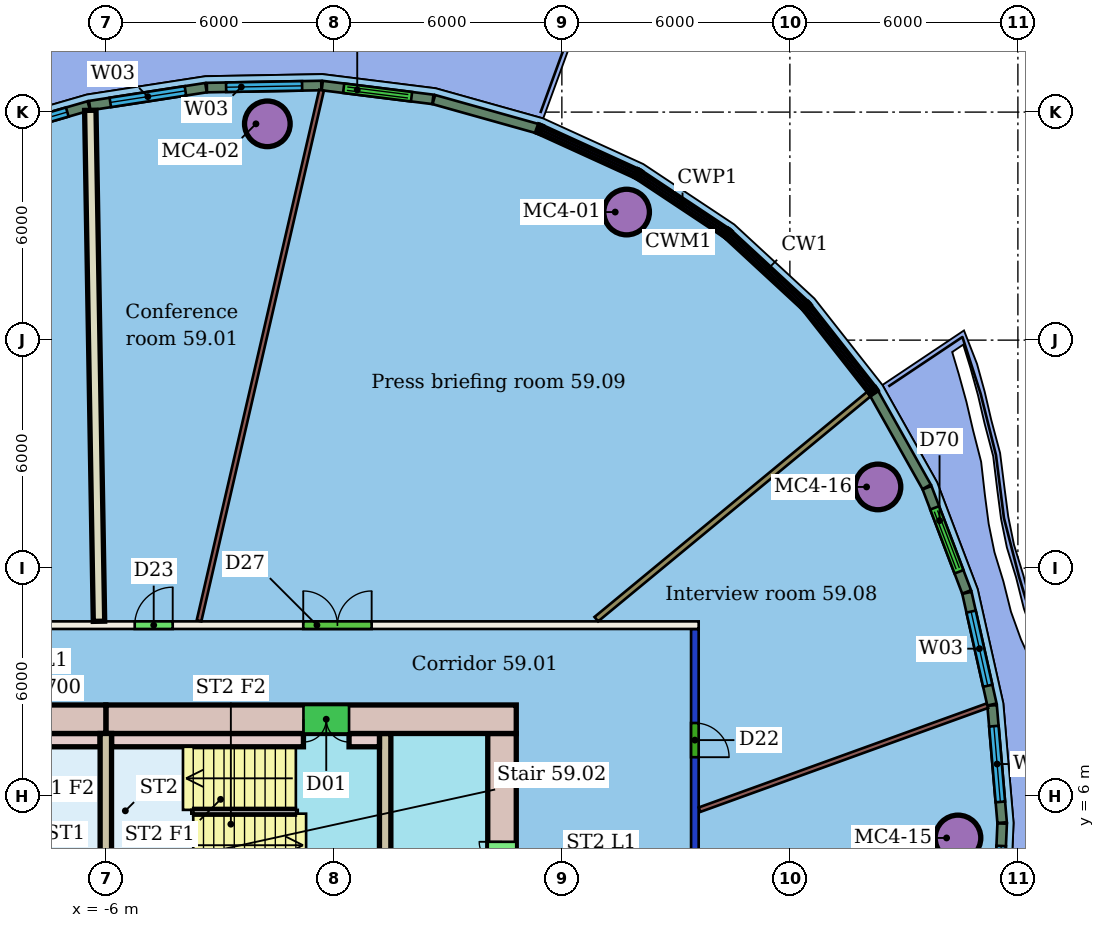
"""IFC4 building model, lengths in metres.
Left out: names, types, materials, properties, quantities, classifications, styles, units other than length and angle.
Written with IfcOpenShell. Run it as: python <this file> out.ifc"""

import sys

from ifc_helpers import new_model, si_unit, direction, frame, frame_2d, origin, origin_2d, place, context, subcontext, project, spatial, rectangle, hollow_circle, extrude, element, fill, save


model = new_model("IFC4")
c1 = context("Model", 3, precision=1e-05, world=origin(), true_north=direction((0.0, 1.0)))
c2 = subcontext(c1, "Body", "Model", "MODEL_VIEW")
j1 = project(units=[si_unit("LENGTHUNIT", "METRE"), si_unit("PLANEANGLEUNIT", "RADIAN")], contexts=[c1])
p1 = place(None, origin())
s1 = spatial("IfcSite", under=j1, at=p1, CompositionType="ELEMENT")
p2 = place(p1, origin())
s2 = spatial("IfcBuilding", under=s1, at=p2, CompositionType="ELEMENT")
p3 = place(p2, frame((0.0, 0.0, 238.9)))
s3 = spatial("IfcBuildingStorey", under=s2, at=p3, CompositionType="ELEMENT", Elevation=238.9)
for number, where, z_axis, x_axis in (
    (1, (7.704, 21.37, 0.0), (0.0, 0.0, 1.0), (1.0, 0.0, 0.0)),
    (2, (-1.75, 23.691, 0.0), (0.0, 0.0, 1.0), (1.0, 0.0, 0.0)),
    (3, (16.424, 4.901, 0.0), (0.0, 0.0, 1.0), (1.0, 0.0, 0.0)),
    (4, (14.318, 14.137, 0.0), (0.0, 0.0, 1.0), (1.0, 0.0, 0.0)),
):
    element("IfcColumn", number, at=place(p3, frame(where, z_axis=z_axis, x_axis=x_axis)), inside=s3, PredefinedType="COLUMN", context=c2, shape_type="SweptSolid", body=[
        extrude(hollow_circle(Radius=0.6, WallThickness=0.045, at=origin_2d()), origin(), (0.0, 0.0, 1.0), 3.4),
    ])
p4 = place(p3, frame((-21.6, 10.5, 0.0), z_axis=(0.0, 0.0, 1.0), x_axis=(1.0, 0.0, 0.0)))
e5 = element("IfcWall", 5, at=p4, inside=s3, PredefinedType="PARTITIONING", context=c2, shape_type="SweptSolid", body=[
    extrude(rectangle(XDim=31.2, YDim=0.2, at=frame_2d((15.6, 0.0))), origin(), (0.0, 0.0, 1.0), 3.4),
])
p5 = place(p4, frame((16.36, 0.0, 0.0)))
e6 = element("IfcOpeningElement", 6, at=p5, cuts=e5, PredefinedType="OPENING", context=c2, shape_type="SweptSolid", body=[
    extrude(rectangle(XDim=1.0, YDim=2.4, at=frame_2d((0.5, 1.2))), frame((0.0, 0.11, 0.0), z_axis=(0.0, -1.0, 0.0), x_axis=(1.0, 0.0, 0.0)), (0.0, 0.0, 1.0), 0.22),
])
p6 = place(p4, frame((9.334, 0.0, 0.0)))
e7 = element("IfcOpeningElement", 7, at=p6, cuts=e5, PredefinedType="OPENING", context=c2, shape_type="SweptSolid", body=[
    extrude(rectangle(XDim=1.8, YDim=2.4, at=frame_2d((0.9, 1.2))), frame((0.0, 0.11, 0.0), z_axis=(0.0, -1.0, 0.0), x_axis=(1.0, 0.0, 0.0)), (0.0, 0.0, 1.0), 0.22),
])
p7 = place(p4, frame((20.795, 0.0, 0.0)))
e8 = element("IfcOpeningElement", 8, at=p7, cuts=e5, PredefinedType="OPENING", context=c2, shape_type="SweptSolid", body=[
    extrude(rectangle(XDim=1.8, YDim=2.4, at=frame_2d((0.9, 1.2))), frame((0.0, 0.11, 0.0), z_axis=(0.0, -1.0, 0.0), x_axis=(1.0, 0.0, 0.0)), (0.0, 0.0, 1.0), 0.22),
])
p8 = place(p3, frame((9.5, 10.4, 0.0), z_axis=(0.0, 0.0, 1.0), x_axis=(0.0, -1.0, 0.0)))
e9 = element("IfcWall", 9, at=p8, inside=s3, PredefinedType="PARTITIONING", context=c2, shape_type="SweptSolid", body=[
    extrude(rectangle(XDim=20.8, YDim=0.2, at=frame_2d((10.4, 0.0))), origin(), (0.0, 0.0, 1.0), 3.0),
])
p9 = place(p8, frame((7.867, 0.0, 0.0)))
e10 = element("IfcOpeningElement", 10, at=p9, cuts=e9, PredefinedType="OPENING", context=c2, shape_type="SweptSolid", body=[
    extrude(rectangle(XDim=1.5, YDim=2.1, at=frame_2d((0.75, 1.05))), frame((0.0, 0.11, 0.0), z_axis=(0.0, -1.0, 0.0), x_axis=(1.0, 0.0, 0.0)), (0.0, 0.0, 1.0), 0.22),
])
p10 = place(p8, frame((2.474, 0.0, 0.0)))
e11 = element("IfcOpeningElement", 11, at=p10, cuts=e9, PredefinedType="OPENING", context=c2, shape_type="SweptSolid", body=[
    extrude(rectangle(XDim=0.9, YDim=2.1, at=frame_2d((0.45, 1.05))), frame((0.0, 0.11, 0.0), z_axis=(0.0, -1.0, 0.0), x_axis=(1.0, 0.0, 0.0)), (0.0, 0.0, 1.0), 0.22),
])
p11 = place(p3, frame((-0.324, 24.575, 0.0), z_axis=(0.0, 0.0, 1.0), x_axis=(-0.225044916304, -0.974348390282, 0.0)))
e12 = element("IfcWall", 12, at=p11, inside=s3, PredefinedType="PARTITIONING", context=c2, shape_type="SweptSolid", body=[
    extrude(rectangle(XDim=14.329, YDim=0.125, at=frame_2d((7.165, 0.0))), origin(), (0.0, 0.0, 1.0), 3.4),
])
p12 = place(p3, frame((-6.409, 24.047, 0.0), z_axis=(0.0, 0.0, 1.0), x_axis=(0.016994712399, -0.999855579447, 0.0)))
e13 = element("IfcWall", 13, at=p12, inside=s3, PredefinedType="PARTITIONING", context=c2, shape_type="SweptSolid", body=[
    extrude(rectangle(XDim=13.446, YDim=0.3, at=frame_2d((6.723, 0.0))), origin(), (0.0, 0.0, 1.0), 3.4),
])
p13 = place(p3, frame((17.196, 8.382, 0.0), z_axis=(0.0, 0.0, 1.0), x_axis=(-0.94047829394, -0.339853760649, 0.0)))
e14 = element("IfcWall", 14, at=p13, inside=s3, PredefinedType="PARTITIONING", context=c2, shape_type="SweptSolid", body=[
    extrude(rectangle(XDim=8.054, YDim=0.125, at=frame_2d((4.027, 0.0))), origin(), (0.0, 0.0, 1.0), 3.4),
])
p14 = place(p3, frame((14.082, 16.583, 0.0), z_axis=(0.0, 0.0, 1.0), x_axis=(-0.771079906802, -0.636738390021, 0.0)))
e15 = element("IfcWall", 15, at=p14, inside=s3, PredefinedType="PARTITIONING", context=c2, shape_type="SweptSolid", body=[
    extrude(rectangle(XDim=9.306, YDim=0.15, at=frame_2d((4.653, 0.0))), origin(), (0.0, 0.0, 1.0), 3.4),
])
p15 = place(p3, frame((5.354, 23.567, 0.0), z_axis=(0.0, 0.0, 1.0), x_axis=(-0.962900295721, 0.269857407718, 0.0)))
e16 = element("IfcWall", 16, at=p15, inside=s3, PredefinedType="SOLIDWALL", context=c2, shape_type="SweptSolid", body=[
    extrude(rectangle(XDim=2.826, YDim=0.25, at=frame_2d((1.413, 0.0))), origin(), (0.0, 0.0, 1.0), 3.05),
])
p16 = place(p3, frame((2.606, 24.335, 0.0), z_axis=(0.0, 0.0, 1.0), x_axis=(-0.992289397798, 0.123942531107, 0.0)))
e17 = element("IfcWall", 17, at=p16, inside=s3, PredefinedType="SOLIDWALL", context=c2, shape_type="SweptSolid", body=[
    extrude(rectangle(XDim=2.933, YDim=0.25, at=frame_2d((1.467, 0.0))), origin(), (0.0, 0.0, 1.0), 3.05),
])
p17 = place(p16, frame((0.566, 0.0, 0.0)))
e18 = element("IfcOpeningElement", 18, at=p17, cuts=e17, PredefinedType="OPENING", context=c2, shape_type="SweptSolid", body=[
    extrude(rectangle(XDim=1.8, YDim=2.4, at=frame_2d((0.9, 1.2))), frame((0.0, 0.135, 0.0), z_axis=(0.0, -1.0, 0.0), x_axis=(1.0, 0.0, 0.0)), (0.0, 0.0, 1.0), 0.27),
])
p18 = place(p3, frame((-0.33, 24.7, 0.0), z_axis=(0.0, 0.0, 1.0), x_axis=(-0.999837951795, -0.018001948524, 0.0)))
e19 = element("IfcWall", 19, at=p18, inside=s3, PredefinedType="SOLIDWALL", context=c2, shape_type="SweptSolid", body=[
    extrude(rectangle(XDim=3.011, YDim=0.25, at=frame_2d((1.505, 0.0))), origin(), (0.0, 0.0, 1.0), 3.05),
])
p19 = place(p18, frame((0.505, 0.0, 0.9)))
e20 = element("IfcOpeningElement", 20, at=p19, cuts=e19, PredefinedType="OPENING", context=c2, shape_type="SweptSolid", body=[
    extrude(rectangle(XDim=2.0, YDim=2.1, at=frame_2d((1.0, 1.05))), frame((0.0, 0.135, 0.0), z_axis=(0.0, -1.0, 0.0), x_axis=(1.0, 0.0, 0.0)), (0.0, 0.0, 1.0), 0.27),
])
p20 = place(p3, frame((-3.365, 24.643, 0.0), z_axis=(0.0, 0.0, 1.0), x_axis=(-0.988271174428, -0.152709154258, 0.0)))
e21 = element("IfcWall", 21, at=p20, inside=s3, PredefinedType="SOLIDWALL", context=c2, shape_type="SweptSolid", body=[
    extrude(rectangle(XDim=3.095, YDim=0.25, at=frame_2d((1.548, 0.0))), origin(), (0.0, 0.0, 1.0), 3.05),
])
p21 = place(p20, frame((0.548, 0.0, 0.9)))
e22 = element("IfcOpeningElement", 22, at=p21, cuts=e21, PredefinedType="OPENING", context=c2, shape_type="SweptSolid", body=[
    extrude(rectangle(XDim=2.0, YDim=2.1, at=frame_2d((1.0, 1.05))), frame((0.0, 0.135, 0.0), z_axis=(0.0, -1.0, 0.0), x_axis=(1.0, 0.0, 0.0)), (0.0, 0.0, 1.0), 0.27),
])
p22 = place(p3, frame((-6.447, 24.166, 0.0), z_axis=(0.0, 0.0, 1.0), x_axis=(-0.960582609331, -0.277994695364, 0.0)))
e23 = element("IfcWall", 23, at=p22, inside=s3, PredefinedType="SOLIDWALL", context=c2, shape_type="SweptSolid", body=[
    extrude(rectangle(XDim=3.18, YDim=0.25, at=frame_2d((1.59, 0.0))), origin(), (0.0, 0.0, 1.0), 3.05),
])
p23 = place(p22, frame((0.59, 0.0, 0.9)))
e24 = element("IfcOpeningElement", 24, at=p23, cuts=e23, PredefinedType="OPENING", context=c2, shape_type="SweptSolid", body=[
    extrude(rectangle(XDim=2.0, YDim=2.1, at=frame_2d((1.0, 1.05))), frame((0.0, 0.135, 0.0), z_axis=(0.0, -1.0, 0.0), x_axis=(1.0, 0.0, 0.0)), (0.0, 0.0, 1.0), 0.27),
])
p24 = place(p3, frame((17.449, 2.103, 0.0), z_axis=(0.0, 0.0, 1.0), x_axis=(0.042837542995, 0.99908205114, 0.0)))
e25 = element("IfcWall", 25, at=p24, inside=s3, PredefinedType="SOLIDWALL", context=c2, shape_type="SweptSolid", body=[
    extrude(rectangle(XDim=3.18, YDim=0.25, at=frame_2d((1.59, 0.0))), origin(), (0.0, 0.0, 1.0), 3.05),
])
p25 = place(p24, frame((0.59, 0.0, 0.9)))
e26 = element("IfcOpeningElement", 26, at=p25, cuts=e25, PredefinedType="OPENING", context=c2, shape_type="SweptSolid", body=[
    extrude(rectangle(XDim=2.0, YDim=2.1, at=frame_2d((1.0, 1.05))), frame((0.0, 0.135, 0.0), z_axis=(0.0, -1.0, 0.0), x_axis=(1.0, 0.0, 0.0)), (0.0, 0.0, 1.0), 0.27),
])
p26 = place(p3, frame((17.585, 5.304, 0.0), z_axis=(0.0, 0.0, 1.0), x_axis=(-0.08534968294, 0.996351058424, 0.0)))
e27 = element("IfcWall", 27, at=p26, inside=s3, PredefinedType="SOLIDWALL", context=c2, shape_type="SweptSolid", body=[
    extrude(rectangle(XDim=3.095, YDim=0.25, at=frame_2d((1.547, 0.0))), origin(), (0.0, 0.0, 1.0), 3.05),
])
p27 = place(p26, frame((0.548, 0.0, 0.9)))
e28 = element("IfcOpeningElement", 28, at=p27, cuts=e27, PredefinedType="OPENING", context=c2, shape_type="SweptSolid", body=[
    extrude(rectangle(XDim=2.0, YDim=2.1, at=frame_2d((1.0, 1.05))), frame((0.0, 0.135, 0.0), z_axis=(0.0, -1.0, 0.0), x_axis=(1.0, 0.0, 0.0)), (0.0, 0.0, 1.0), 0.27),
])
p28 = place(p3, frame((17.317, 8.413, 0.0), z_axis=(0.0, 0.0, 1.0), x_axis=(-0.218861882791, 0.975755848694, 0.0)))
e29 = element("IfcWall", 29, at=p28, inside=s3, PredefinedType="SOLIDWALL", context=c2, shape_type="SweptSolid", body=[
    extrude(rectangle(XDim=3.011, YDim=0.25, at=frame_2d((1.505, 0.0))), origin(), (0.0, 0.0, 1.0), 3.05),
])
p29 = place(p28, frame((0.505, 0.0, 0.9)))
e30 = element("IfcOpeningElement", 30, at=p29, cuts=e29, PredefinedType="OPENING", context=c2, shape_type="SweptSolid", body=[
    extrude(rectangle(XDim=2.0, YDim=2.1, at=frame_2d((1.0, 1.05))), frame((0.0, 0.135, 0.0), z_axis=(0.0, -1.0, 0.0), x_axis=(1.0, 0.0, 0.0)), (0.0, 0.0, 1.0), 0.27),
])
p30 = place(p3, frame((16.651, 11.375, 0.0), z_axis=(0.0, 0.0, 1.0), x_axis=(-0.35511592295, 0.934822272556, 0.0)))
e31 = element("IfcWall", 31, at=p30, inside=s3, PredefinedType="SOLIDWALL", context=c2, shape_type="SweptSolid", body=[
    extrude(rectangle(XDim=2.933, YDim=0.25, at=frame_2d((1.466, 0.0))), origin(), (0.0, 0.0, 1.0), 3.05),
])
p31 = place(p30, frame((0.566, 0.0, 0.0)))
e32 = element("IfcOpeningElement", 32, at=p31, cuts=e31, PredefinedType="OPENING", context=c2, shape_type="SweptSolid", body=[
    extrude(rectangle(XDim=1.8, YDim=2.4, at=frame_2d((0.9, 1.2))), frame((0.0, 0.135, 0.0), z_axis=(0.0, -1.0, 0.0), x_axis=(1.0, 0.0, 0.0)), (0.0, 0.0, 1.0), 0.27),
])
p32 = place(p3, frame((15.598, 14.141, 0.0), z_axis=(0.0, 0.0, 1.0), x_axis=(-0.489949521211, 0.871750805371, 0.0)))
e33 = element("IfcWall", 33, at=p32, inside=s3, PredefinedType="SOLIDWALL", context=c2, shape_type="SweptSolid", body=[
    extrude(rectangle(XDim=2.826, YDim=0.25, at=frame_2d((1.413, 0.0))), origin(), (0.0, 0.0, 1.0), 3.05),
])
p33 = place(p3, frame((4.8, 8.025, 0.0), z_axis=(0.0, 0.0, 1.0), x_axis=(-1.0, 0.0, 0.0)))
e34 = element("IfcWall", 34, at=p33, inside=s3, PredefinedType="SHEAR", context=c2, shape_type="SweptSolid", body=[
    extrude(rectangle(XDim=10.8, YDim=0.75, at=frame_2d((5.4, 0.0))), origin(), (0.0, 0.0, 1.0), 3.3),
])
p34 = place(p33, frame((4.4, 0.0, 0.0)))
e35 = element("IfcOpeningElement", 35, at=p34, cuts=e34, PredefinedType="OPENING", context=c2, shape_type="SweptSolid", body=[
    extrude(rectangle(XDim=1.2, YDim=2.1, at=frame_2d((0.6, 1.05))), frame((0.0, 0.385, 0.0), z_axis=(0.0, -1.0, 0.0), x_axis=(1.0, 0.0, 0.0)), (0.0, 0.0, 1.0), 0.77),
])
p35 = place(p3, frame((-6.0, 8.025, 0.0), z_axis=(0.0, 0.0, 1.0), x_axis=(-1.0, 0.0, 0.0)))
e36 = element("IfcWall", 36, at=p35, inside=s3, PredefinedType="SHEAR", context=c2, shape_type="SweptSolid", body=[
    extrude(rectangle(XDim=10.8, YDim=0.75, at=frame_2d((5.4, 0.0))), origin(), (0.0, 0.0, 1.0), 3.3),
])
p36 = place(p35, frame((5.2, 0.0, 0.0)))
e37 = element("IfcOpeningElement", 37, at=p36, cuts=e36, PredefinedType="OPENING", context=c2, shape_type="SweptSolid", body=[
    extrude(rectangle(XDim=1.2, YDim=2.1, at=frame_2d((0.6, 1.05))), frame((0.0, 0.385, 0.0), z_axis=(0.0, -1.0, 0.0), x_axis=(1.0, 0.0, 0.0)), (0.0, 0.0, 1.0), 0.77),
])
p37 = place(p3, frame((4.425, -7.65, 0.0), z_axis=(0.0, 0.0, 1.0), x_axis=(0.0, 1.0, 0.0)))
e38 = element("IfcWall", 38, at=p37, inside=s3, PredefinedType="SHEAR", context=c2, shape_type="SweptSolid", body=[
    extrude(rectangle(XDim=15.3, YDim=0.75, at=frame_2d((7.65, 0.0))), origin(), (0.0, 0.0, 1.0), 3.3),
])
p38 = place(p37, frame((2.85, 0.0, 0.0)))
e39 = element("IfcOpeningElement", 39, at=p38, cuts=e38, PredefinedType="OPENING", context=c2, shape_type="SweptSolid", body=[
    extrude(rectangle(XDim=1.2, YDim=2.1, at=frame_2d((0.6, 1.05))), frame((0.0, 0.385, 0.0), z_axis=(0.0, -1.0, 0.0), x_axis=(1.0, 0.0, 0.0)), (0.0, 0.0, 1.0), 0.77),
])
p39 = place(p37, frame((11.25, 0.0, 0.0)))
e40 = element("IfcOpeningElement", 40, at=p39, cuts=e38, PredefinedType="OPENING", context=c2, shape_type="SweptSolid", body=[
    extrude(rectangle(XDim=1.2, YDim=2.1, at=frame_2d((0.6, 1.05))), frame((0.0, 0.385, 0.0), z_axis=(0.0, -1.0, 0.0), x_axis=(1.0, 0.0, 0.0)), (0.0, 0.0, 1.0), 0.77),
])
p40 = place(p3, frame((1.35, -7.65, 0.0), z_axis=(0.0, 0.0, 1.0), x_axis=(0.0, 1.0, 0.0)))
e41 = element("IfcWall", 41, at=p40, inside=s3, PredefinedType="SHEAR", context=c2, shape_type="SweptSolid", body=[
    extrude(rectangle(XDim=15.3, YDim=0.3, at=frame_2d((7.65, 0.0))), origin(), (0.0, 0.0, 1.0), 3.3),
])
p41 = place(p40, frame((1.56, 0.0, 0.0)))
e42 = element("IfcOpeningElement", 42, at=p41, cuts=e41, PredefinedType="OPENING", context=c2, shape_type="SweptSolid", body=[
    extrude(rectangle(XDim=1.0, YDim=2.1, at=frame_2d((0.5, 1.05))), frame((0.0, 0.16, 0.0), z_axis=(0.0, -1.0, 0.0), x_axis=(1.0, 0.0, 0.0)), (0.0, 0.0, 1.0), 0.32),
])
p42 = place(p40, frame((6.9, 0.0, 0.0)))
e43 = element("IfcOpeningElement", 43, at=p42, cuts=e41, PredefinedType="OPENING", context=c2, shape_type="SweptSolid", body=[
    extrude(rectangle(XDim=1.5, YDim=2.1, at=frame_2d((0.75, 1.05))), frame((0.0, 0.16, 0.0), z_axis=(0.0, -1.0, 0.0), x_axis=(1.0, 0.0, 0.0)), (0.0, 0.0, 1.0), 0.32),
])
p43 = place(p3, frame((-6.0, 3.88, 0.0), z_axis=(0.0, 0.0, 1.0), x_axis=(0.0, 1.0, 0.0)))
e44 = element("IfcWall", 44, at=p43, inside=s3, PredefinedType="SHEAR", context=c2, shape_type="SweptSolid", body=[
    extrude(rectangle(XDim=3.77, YDim=0.3, at=frame_2d((1.885, 0.0))), origin(), (0.0, 0.0, 1.0), 3.3),
])
for number, where, z_axis, x_axis in (
    (45, (-11.2, 7.475, 0.0), (0.0, 0.0, 1.0), (1.0, 0.0, 0.0)),
    (46, (-5.85, 7.475, 0.0), (0.0, 0.0, 1.0), (1.0, 0.0, 0.0)),
):
    element("IfcWall", number, at=place(p3, frame(where, z_axis=z_axis, x_axis=x_axis)), inside=s3, PredefinedType="SHEAR", context=c2, shape_type="SweptSolid", body=[
        extrude(rectangle(XDim=5.05, YDim=0.35, at=frame_2d((2.525, 0.0))), origin(), (0.0, 0.0, 1.0), 3.3),
    ])
p44 = place(p3, frame((0.4, 7.475, 0.0), z_axis=(0.0, 0.0, 1.0), x_axis=(1.0, 0.0, 0.0)))
e47 = element("IfcWall", 47, at=p44, inside=s3, PredefinedType="SHEAR", context=c2, shape_type="SweptSolid", body=[
    extrude(rectangle(XDim=0.8, YDim=0.35, at=frame_2d((0.4, 0.0))), origin(), (0.0, 0.0, 1.0), 3.3),
])
p45 = place(p5, origin())
e48 = element("IfcDoor", 48, at=p45, inside=s3, OperationType="SINGLE_SWING_RIGHT", PredefinedType="DOOR", context=c2, shape_type="SweptSolid", body=[
    extrude(rectangle(XDim=1.0, YDim=2.4, at=frame_2d((0.5, 1.2))), frame((0.0, 0.025, 0.0), z_axis=(0.0, -1.0, 0.0), x_axis=(1.0, 0.0, 0.0)), (0.0, 0.0, 1.0), 0.05),
])
fill(e6, e48)
p46 = place(p10, origin())
e49 = element("IfcDoor", 49, at=p46, inside=s3, OperationType="SINGLE_SWING_RIGHT", PredefinedType="DOOR", context=c2, shape_type="SweptSolid", body=[
    extrude(rectangle(XDim=0.9, YDim=2.1, at=frame_2d((0.45, 1.05))), frame((0.0, 0.025, 0.0), z_axis=(0.0, -1.0, 0.0), x_axis=(1.0, 0.0, 0.0)), (0.0, 0.0, 1.0), 0.05),
])
fill(e11, e49)
p47 = place(p7, origin())
e50 = element("IfcDoor", 50, at=p47, inside=s3, OperationType="DOUBLE_DOOR_SINGLE_SWING", PredefinedType="DOOR", context=c2, shape_type="SweptSolid", body=[
    extrude(rectangle(XDim=1.8, YDim=2.4, at=frame_2d((0.9, 1.2))), frame((0.0, 0.025, 0.0), z_axis=(0.0, -1.0, 0.0), x_axis=(1.0, 0.0, 0.0)), (0.0, 0.0, 1.0), 0.05),
])
fill(e8, e50)
p48 = place(p17, origin())
e51 = element("IfcDoor", 51, at=p48, inside=s3, OperationType="DOUBLE_DOOR_SLIDING", PredefinedType="DOOR", context=c2, shape_type="SweptSolid", body=[
    extrude(rectangle(XDim=1.8, YDim=2.4, at=frame_2d((0.9, 1.2))), frame((0.0, 0.025, 0.0), z_axis=(0.0, -1.0, 0.0), x_axis=(1.0, 0.0, 0.0)), (0.0, 0.0, 1.0), 0.05),
])
fill(e18, e51)
p49 = place(p19, origin())
e52 = element("IfcWindow", 52, at=p49, inside=s3, PartitioningType="SINGLE_PANEL", PredefinedType="WINDOW", context=c2, shape_type="SweptSolid", body=[
    extrude(rectangle(XDim=2.0, YDim=2.1, at=frame_2d((1.0, 1.05))), frame((0.0, 0.03, 0.0), z_axis=(0.0, -1.0, 0.0), x_axis=(1.0, 0.0, 0.0)), (0.0, 0.0, 1.0), 0.06),
])
fill(e20, e52)
p50 = place(p21, origin())
e53 = element("IfcWindow", 53, at=p50, inside=s3, PartitioningType="SINGLE_PANEL", PredefinedType="WINDOW", context=c2, shape_type="SweptSolid", body=[
    extrude(rectangle(XDim=2.0, YDim=2.1, at=frame_2d((1.0, 1.05))), frame((0.0, 0.03, 0.0), z_axis=(0.0, -1.0, 0.0), x_axis=(1.0, 0.0, 0.0)), (0.0, 0.0, 1.0), 0.06),
])
fill(e22, e53)
p51 = place(p23, origin())
e54 = element("IfcWindow", 54, at=p51, inside=s3, PartitioningType="SINGLE_PANEL", PredefinedType="WINDOW", context=c2, shape_type="SweptSolid", body=[
    extrude(rectangle(XDim=2.0, YDim=2.1, at=frame_2d((1.0, 1.05))), frame((0.0, 0.03, 0.0), z_axis=(0.0, -1.0, 0.0), x_axis=(1.0, 0.0, 0.0)), (0.0, 0.0, 1.0), 0.06),
])
fill(e24, e54)
p52 = place(p25, origin())
e55 = element("IfcWindow", 55, at=p52, inside=s3, PartitioningType="SINGLE_PANEL", PredefinedType="WINDOW", context=c2, shape_type="SweptSolid", body=[
    extrude(rectangle(XDim=2.0, YDim=2.1, at=frame_2d((1.0, 1.05))), frame((0.0, 0.03, 0.0), z_axis=(0.0, -1.0, 0.0), x_axis=(1.0, 0.0, 0.0)), (0.0, 0.0, 1.0), 0.06),
])
fill(e26, e55)
p53 = place(p27, origin())
e56 = element("IfcWindow", 56, at=p53, inside=s3, PartitioningType="SINGLE_PANEL", PredefinedType="WINDOW", context=c2, shape_type="SweptSolid", body=[
    extrude(rectangle(XDim=2.0, YDim=2.1, at=frame_2d((1.0, 1.05))), frame((0.0, 0.03, 0.0), z_axis=(0.0, -1.0, 0.0), x_axis=(1.0, 0.0, 0.0)), (0.0, 0.0, 1.0), 0.06),
])
fill(e28, e56)
p54 = place(p29, origin())
e57 = element("IfcWindow", 57, at=p54, inside=s3, PartitioningType="SINGLE_PANEL", PredefinedType="WINDOW", context=c2, shape_type="SweptSolid", body=[
    extrude(rectangle(XDim=2.0, YDim=2.1, at=frame_2d((1.0, 1.05))), frame((0.0, 0.03, 0.0), z_axis=(0.0, -1.0, 0.0), x_axis=(1.0, 0.0, 0.0)), (0.0, 0.0, 1.0), 0.06),
])
fill(e30, e57)
p55 = place(p31, origin())
e58 = element("IfcDoor", 58, at=p55, inside=s3, OperationType="DOUBLE_DOOR_SLIDING", PredefinedType="DOOR", context=c2, shape_type="SweptSolid", body=[
    extrude(rectangle(XDim=1.8, YDim=2.4, at=frame_2d((0.9, 1.2))), frame((0.0, 0.025, 0.0), z_axis=(0.0, -1.0, 0.0), x_axis=(1.0, 0.0, 0.0)), (0.0, 0.0, 1.0), 0.05),
])
fill(e32, e58)
p56 = place(p34, origin())
e59 = element("IfcDoor", 59, at=p56, inside=s3, OperationType="DOUBLE_DOOR_SINGLE_SWING", PredefinedType="NOTDEFINED", context=c2, shape_type="SweptSolid", body=[
    extrude(rectangle(XDim=1.2, YDim=2.1, at=frame_2d((0.6, 1.05))), frame((0.0, 0.025, 0.0), z_axis=(0.0, -1.0, 0.0), x_axis=(1.0, 0.0, 0.0)), (0.0, 0.0, 1.0), 0.05),
])
fill(e35, e59)
p57 = place(p39, origin())
e60 = element("IfcDoor", 60, at=p57, inside=s3, OperationType="DOUBLE_DOOR_SINGLE_SWING", PredefinedType="NOTDEFINED", context=c2, shape_type="SweptSolid", body=[
    extrude(rectangle(XDim=1.2, YDim=2.1, at=frame_2d((0.6, 1.05))), frame((0.0, 0.025, 0.0), z_axis=(0.0, -1.0, 0.0), x_axis=(1.0, 0.0, 0.0)), (0.0, 0.0, 1.0), 0.05),
])
fill(e40, e60)
save(model, sys.argv[1])
